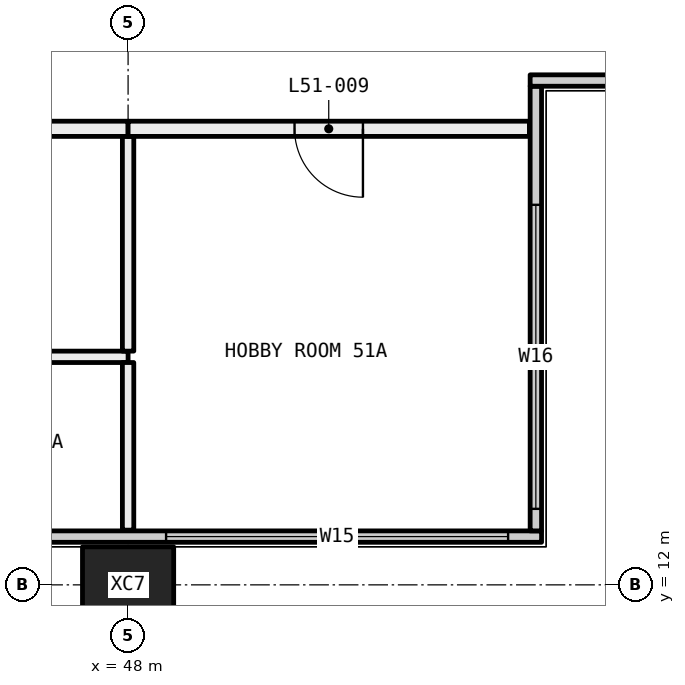
"""IFC4 building model, lengths in metres.
Left out: names, types, materials, properties, quantities, classifications, styles, units other than length and angle.
Written with IfcOpenShell. Run it as: python <this file> out.ifc"""

import sys

from ifc_helpers import new_model, si_unit, direction, frame, frame_2d, origin, origin_2d, place, context, subcontext, project, spatial, rectangle, hollow_rectangle, extrude, element, fill, save


model = new_model("IFC4")
c1 = context("Model", 3, precision=1e-05, world=origin(), true_north=direction((0.0, 1.0)))
c2 = subcontext(c1, "Body", "Model", "MODEL_VIEW")
j1 = project(units=[si_unit("LENGTHUNIT", "METRE"), si_unit("PLANEANGLEUNIT", "RADIAN")], contexts=[c1])
p1 = place(None, origin())
s1 = spatial("IfcSite", under=j1, at=p1, CompositionType="ELEMENT")
p2 = place(p1, origin())
s2 = spatial("IfcBuilding", under=s1, at=p2, CompositionType="ELEMENT")
p3 = place(p2, frame((0.0, 0.0, 192.75)))
s3 = spatial("IfcBuildingStorey", under=s2, at=p3, CompositionType="ELEMENT", Elevation=192.75)
p4 = place(p3, frame((48.0, 12.0, -0.4), z_axis=(0.0, 0.0, 1.0), x_axis=(1.0, 0.0, 0.0)))
e1 = element("IfcColumn", 1, at=p4, inside=s3, PredefinedType="COLUMN", context=c2, shape_type="SweptSolid", body=[
    extrude(hollow_rectangle(XDim=1.2, YDim=1.0, WallThickness=0.045, at=origin_2d()), origin(), (0.0, 0.0, 1.0), 3.45),
])
p5 = place(p3, frame((6.56, 12.635, 0.0), z_axis=(0.0, 0.0, 1.0), x_axis=(1.0, 0.0, 0.0)))
e2 = element("IfcWall", 2, at=p5, inside=s3, PredefinedType="ELEMENTEDWALL", context=c2, shape_type="SweptSolid", body=[
    extrude(rectangle(XDim=46.88, YDim=0.15, at=frame_2d((23.44, 0.0))), origin(), (0.0, 0.0, 1.0), 3.05),
])
p6 = place(p5, frame((0.44, 0.0, 0.45)))
e3 = element("IfcOpeningElement", 3, at=p6, cuts=e2, PredefinedType="OPENING", context=c2, shape_type="SweptSolid", body=[
    extrude(rectangle(XDim=4.5, YDim=2.55, at=frame_2d((2.25, 1.275))), frame((0.0, 0.085, 0.0), z_axis=(0.0, -1.0, 0.0), x_axis=(1.0, 0.0, 0.0)), (0.0, 0.0, 1.0), 0.17),
])
p7 = place(p5, frame((7.69, 0.0, 0.45)))
e4 = element("IfcOpeningElement", 4, at=p7, cuts=e2, PredefinedType="OPENING", context=c2, shape_type="SweptSolid", body=[
    extrude(rectangle(XDim=3.25, YDim=2.55, at=frame_2d((1.625, 1.275))), frame((0.0, 0.085, 0.0), z_axis=(0.0, -1.0, 0.0), x_axis=(1.0, 0.0, 0.0)), (0.0, 0.0, 1.0), 0.17),
])
p8 = place(p5, frame((11.94, 0.0, 0.45)))
e5 = element("IfcOpeningElement", 5, at=p8, cuts=e2, PredefinedType="OPENING", context=c2, shape_type="SweptSolid", body=[
    extrude(rectangle(XDim=3.25, YDim=2.55, at=frame_2d((1.625, 1.275))), frame((0.0, 0.085, 0.0), z_axis=(0.0, -1.0, 0.0), x_axis=(1.0, 0.0, 0.0)), (0.0, 0.0, 1.0), 0.17),
])
p9 = place(p5, frame((19.69, 0.0, 0.45)))
e6 = element("IfcOpeningElement", 6, at=p9, cuts=e2, PredefinedType="OPENING", context=c2, shape_type="SweptSolid", body=[
    extrude(rectangle(XDim=3.25, YDim=2.55, at=frame_2d((1.625, 1.275))), frame((0.0, 0.085, 0.0), z_axis=(0.0, -1.0, 0.0), x_axis=(1.0, 0.0, 0.0)), (0.0, 0.0, 1.0), 0.17),
])
p10 = place(p5, frame((23.94, 0.0, 0.45)))
e7 = element("IfcOpeningElement", 7, at=p10, cuts=e2, PredefinedType="OPENING", context=c2, shape_type="SweptSolid", body=[
    extrude(rectangle(XDim=2.0, YDim=2.55, at=frame_2d((1.0, 1.275))), frame((0.0, 0.085, 0.0), z_axis=(0.0, -1.0, 0.0), x_axis=(1.0, 0.0, 0.0)), (0.0, 0.0, 1.0), 0.17),
])
p11 = place(p5, frame((31.69, 0.0, 0.45)))
e8 = element("IfcOpeningElement", 8, at=p11, cuts=e2, PredefinedType="OPENING", context=c2, shape_type="SweptSolid", body=[
    extrude(rectangle(XDim=3.25, YDim=2.55, at=frame_2d((1.625, 1.275))), frame((0.0, 0.085, 0.0), z_axis=(0.0, -1.0, 0.0), x_axis=(1.0, 0.0, 0.0)), (0.0, 0.0, 1.0), 0.17),
])
p12 = place(p5, frame((35.94, 0.0, 0.45)))
e9 = element("IfcOpeningElement", 9, at=p12, cuts=e2, PredefinedType="OPENING", context=c2, shape_type="SweptSolid", body=[
    extrude(rectangle(XDim=3.25, YDim=2.55, at=frame_2d((1.625, 1.275))), frame((0.0, 0.085, 0.0), z_axis=(0.0, -1.0, 0.0), x_axis=(1.0, 0.0, 0.0)), (0.0, 0.0, 1.0), 0.17),
])
p13 = place(p5, frame((41.94, 0.0, 0.45)))
e10 = element("IfcOpeningElement", 10, at=p13, cuts=e2, PredefinedType="OPENING", context=c2, shape_type="SweptSolid", body=[
    extrude(rectangle(XDim=4.5, YDim=2.55, at=frame_2d((2.25, 1.275))), frame((0.0, 0.085, 0.0), z_axis=(0.0, -1.0, 0.0), x_axis=(1.0, 0.0, 0.0)), (0.0, 0.0, 1.0), 0.17),
])
p14 = place(p3, frame((53.365, 12.71, 0.0), z_axis=(0.0, 0.0, 1.0), x_axis=(0.0, 1.0, 0.0)))
e11 = element("IfcWall", 11, at=p14, inside=s3, PredefinedType="ELEMENTEDWALL", context=c2, shape_type="SweptSolid", body=[
    extrude(rectangle(XDim=5.85, YDim=0.15, at=frame_2d((2.925, 0.0))), origin(), (0.0, 0.0, 1.0), 3.05),
])
p15 = place(p14, frame((0.29, 0.0, 0.45)))
e12 = element("IfcOpeningElement", 12, at=p15, cuts=e11, PredefinedType="OPENING", context=c2, shape_type="SweptSolid", body=[
    extrude(rectangle(XDim=4.0, YDim=2.55, at=frame_2d((2.0, 1.275))), frame((0.0, 0.085, 0.0), z_axis=(0.0, -1.0, 0.0), x_axis=(1.0, 0.0, 0.0)), (0.0, 0.0, 1.0), 0.17),
])
p16 = place(p3, frame((53.29, 18.635, 0.0), z_axis=(0.0, 0.0, 1.0), x_axis=(1.0, 0.0, 0.0)))
e13 = element("IfcWall", 13, at=p16, inside=s3, PredefinedType="ELEMENTEDWALL", context=c2, shape_type="SweptSolid", body=[
    extrude(rectangle(XDim=6.15, YDim=0.15, at=frame_2d((3.075, 0.0))), origin(), (0.0, 0.0, 1.0), 3.05),
])
p17 = place(p16, frame((1.71, 0.0, 0.45)))
e14 = element("IfcOpeningElement", 14, at=p17, cuts=e13, PredefinedType="OPENING", context=c2, shape_type="SweptSolid", body=[
    extrude(rectangle(XDim=4.0, YDim=2.55, at=frame_2d((2.0, 1.275))), frame((0.0, 0.085, 0.0), z_axis=(0.0, -1.0, 0.0), x_axis=(1.0, 0.0, 0.0)), (0.0, 0.0, 1.0), 0.17),
])
p18 = place(p3, frame((48.0, 15.0, 0.0), z_axis=(0.0, 0.0, 1.0), x_axis=(-1.0, 0.0, 0.0)))
e15 = element("IfcWall", 15, at=p18, inside=s3, PredefinedType="PARTITIONING", context=c2, shape_type="SweptSolid", body=[
    extrude(rectangle(XDim=5.925, YDim=0.15, at=frame_2d((2.962, 0.0))), origin(), (0.0, 0.0, 1.0), 3.05),
])
p19 = place(p3, frame((48.0, 12.72, 0.0), z_axis=(0.0, 0.0, 1.0), x_axis=(0.0, 1.0, 0.0)))
e16 = element("IfcWall", 16, at=p19, inside=s3, PredefinedType="PARTITIONING", context=c2, shape_type="SweptSolid", body=[
    extrude(rectangle(XDim=2.205, YDim=0.15, at=frame_2d((1.103, 0.0))), origin(), (0.0, 0.0, 1.0), 3.05),
])
p20 = place(p3, frame((48.0, 15.075, 0.0), z_axis=(0.0, 0.0, 1.0), x_axis=(0.0, 1.0, 0.0)))
e17 = element("IfcWall", 17, at=p20, inside=s3, PredefinedType="PARTITIONING", context=c2, shape_type="SweptSolid", body=[
    extrude(rectangle(XDim=2.825, YDim=0.15, at=frame_2d((1.413, 0.0))), origin(), (0.0, 0.0, 1.0), 3.05),
])
p21 = place(p3, frame((48.0, 18.0, 0.0), z_axis=(0.0, 0.0, 1.0), x_axis=(-1.0, 0.0, 0.0)))
e18 = element("IfcWall", 18, at=p21, inside=s3, PredefinedType="PARTITIONING", context=c2, shape_type="SweptSolid", body=[
    extrude(rectangle(XDim=6.0, YDim=0.2, at=frame_2d((3.0, 0.0))), origin(), (0.0, 0.0, 1.0), 3.05),
])
p22 = place(p3, frame((53.28, 18.0, 0.0), z_axis=(0.0, 0.0, 1.0), x_axis=(-1.0, 0.0, 0.0)))
e19 = element("IfcWall", 19, at=p22, inside=s3, PredefinedType="PARTITIONING", context=c2, shape_type="SweptSolid", body=[
    extrude(rectangle(XDim=5.28, YDim=0.2, at=frame_2d((2.64, 0.0))), origin(), (0.0, 0.0, 1.0), 3.05),
])
p23 = place(p22, frame((2.19, 0.0, 0.0)))
e20 = element("IfcOpeningElement", 20, at=p23, cuts=e19, PredefinedType="OPENING", context=c2, shape_type="SweptSolid", body=[
    extrude(rectangle(XDim=0.9, YDim=2.1, at=frame_2d((0.45, 1.05))), frame((0.0, 0.11, 0.0), z_axis=(0.0, -1.0, 0.0), x_axis=(1.0, 0.0, 0.0)), (0.0, 0.0, 1.0), 0.22),
])
p24 = place(p13, origin())
e21 = element("IfcWindow", 21, at=p24, inside=s3, PartitioningType="SINGLE_PANEL", PredefinedType="WINDOW", context=c2, shape_type="SweptSolid", body=[
    extrude(rectangle(XDim=4.5, YDim=2.55, at=frame_2d((2.25, 1.275))), frame((0.0, 0.03, 0.0), z_axis=(0.0, -1.0, 0.0), x_axis=(1.0, 0.0, 0.0)), (0.0, 0.0, 1.0), 0.06),
])
fill(e10, e21)
p25 = place(p15, origin())
e22 = element("IfcWindow", 22, at=p25, inside=s3, PartitioningType="SINGLE_PANEL", PredefinedType="WINDOW", context=c2, shape_type="SweptSolid", body=[
    extrude(rectangle(XDim=4.0, YDim=2.55, at=frame_2d((2.0, 1.275))), frame((0.0, 0.03, 0.0), z_axis=(0.0, -1.0, 0.0), x_axis=(1.0, 0.0, 0.0)), (0.0, 0.0, 1.0), 0.06),
])
fill(e12, e22)
p26 = place(p23, origin())
e23 = element("IfcDoor", 23, at=p26, inside=s3, OperationType="SINGLE_SWING_RIGHT", PredefinedType="DOOR", context=c2, shape_type="SweptSolid", body=[
    extrude(rectangle(XDim=0.9, YDim=2.1, at=frame_2d((0.45, 1.05))), frame((0.0, 0.025, 0.0), z_axis=(0.0, -1.0, 0.0), x_axis=(1.0, 0.0, 0.0)), (0.0, 0.0, 1.0), 0.05),
])
fill(e20, e23)
save(model, sys.argv[1])
